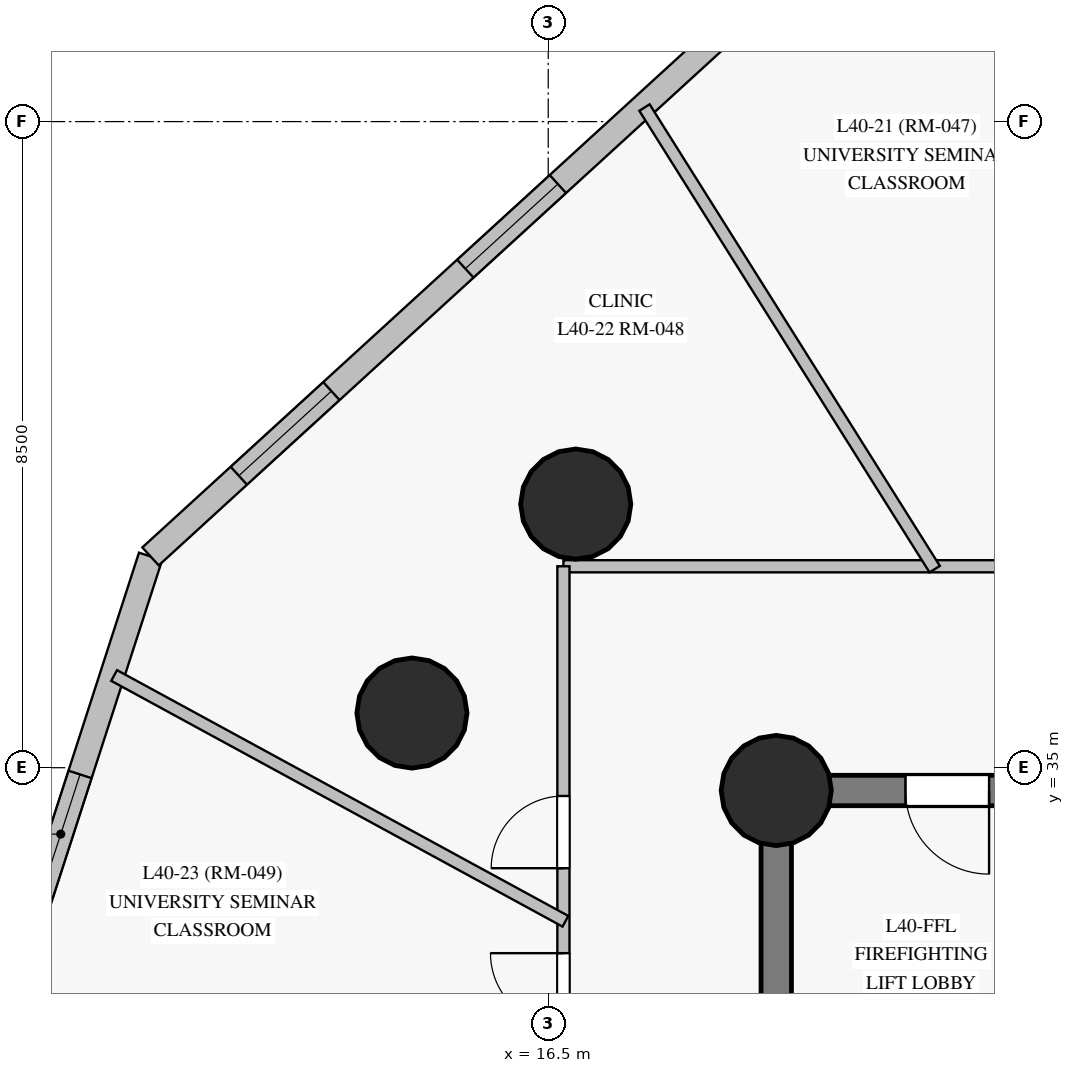
"""IFC4 building model, lengths in metres.
Left out: names, types, materials, properties, quantities, classifications, styles, units other than length and angle.
Written with IfcOpenShell. Run it as: python <this file> out.ifc"""

import sys

from ifc_helpers import new_model, si_unit, direction, frame, frame_2d, origin, origin_with_axes, origin_2d, place, context, subcontext, project, spatial, rectangle, circle, extrude, source, transform, mapped, element, fill, save


model = new_model("IFC4")
c1 = context("Model", 3, precision=1e-05, world=origin(), true_north=direction((0.0, 1.0)))
c2 = subcontext(c1, "Body", "Model", "MODEL_VIEW")
j1 = project(units=[si_unit("LENGTHUNIT", "METRE"), si_unit("PLANEANGLEUNIT", "RADIAN")], contexts=[c1])
p1 = place(None, origin())
s1 = spatial("IfcSite", under=j1, at=p1, CompositionType="ELEMENT")
p2 = place(p1, origin())
s2 = spatial("IfcBuilding", under=s1, at=p2, CompositionType="ELEMENT")
p3 = place(p2, frame((0.0, 0.0, 141.95)))
s3 = spatial("IfcBuildingStorey", under=s2, at=p3, CompositionType="ELEMENT", Elevation=141.95)
p4 = place(p3, frame((26.55, 34.7, 0.0), z_axis=(0.0, 0.0, 1.0), x_axis=(-1.0, 0.0, 0.0)))
e1 = element("IfcWall", 1, at=p4, inside=s3, PredefinedType="SHEAR", context=c2, shape_type="SweptSolid", body=[
    extrude(rectangle(XDim=7.05, YDim=0.4, at=frame_2d((3.525, 0.0))), origin(), (0.0, 0.0, 1.0), 2.825),
])
p5 = place(p4, frame((4.25, 0.0, 0.0)))
e2 = element("IfcOpeningElement", 2, at=p5, cuts=e1, PredefinedType="OPENING", context=c2, shape_type="SweptSolid", body=[
    extrude(rectangle(XDim=1.1, YDim=2.15, at=frame_2d((0.55, 1.075))), frame((0.0, 0.21, 0.0), z_axis=(0.0, -1.0, 0.0), x_axis=(1.0, 0.0, 0.0)), (0.0, 0.0, 1.0), 0.42),
])
p6 = place(p3, frame((19.5, 34.7, 0.0), z_axis=(0.0, 0.0, 1.0), x_axis=(0.0, -1.0, 0.0)))
e3 = element("IfcWall", 3, at=p6, inside=s3, PredefinedType="SHEAR", context=c2, shape_type="SweptSolid", body=[
    extrude(rectangle(XDim=16.4, YDim=0.4, at=frame_2d((8.2, 0.0))), origin(), (0.0, 0.0, 1.0), 2.825),
])
p7 = place(p6, frame((3.1, 0.0, 0.0)))
e4 = element("IfcOpeningElement", 4, at=p7, cuts=e3, PredefinedType="OPENING", context=c2, shape_type="SweptSolid", body=[
    extrude(rectangle(XDim=1.1, YDim=2.15, at=frame_2d((0.55, 1.075))), frame((0.0, 0.21, 0.0), z_axis=(0.0, -1.0, 0.0), x_axis=(1.0, 0.0, 0.0)), (0.0, 0.0, 1.0), 0.42),
])
m1 = source(origin_with_axes(), c2, "Body", "SweptSolid", [
    extrude(circle(Radius=0.725, at=origin_2d()), origin(), (0.0, 0.0, 1.0), 3.05),
])
for number, where, z_axis, x_axis in (
    (5, (19.5, 34.7, 0.0), (0.0, 0.0, 1.0), (1.0, 0.0, 0.0)),
    (6, (16.862, 38.468, 0.0), (0.0, 0.0, 1.0), (1.0, 0.0, 0.0)),
    (7, (14.707, 35.719, 0.0), (0.0, 0.0, 1.0), (1.0, 0.0, 0.0)),
):
    element("IfcColumn", number, at=place(p3, frame(where, z_axis=z_axis, x_axis=x_axis)), inside=s3, PredefinedType="COLUMN", context=c2, shape_type="MappedRepresentation", body=[
        mapped(m1, transform((0.0, 0.0, 0.0), scale=1.0)),
    ])
p8 = place(p3, frame((11.268, 37.78, 0.0), z_axis=(0.0, 0.0, 1.0), x_axis=(-0.307677236824, -0.951490787102, 0.0)))
e8 = element("IfcWall", 8, at=p8, inside=s3, PredefinedType="SOLIDWALL", context=c2, shape_type="SweptSolid", body=[
    extrude(rectangle(XDim=10.861, YDim=0.32, at=frame_2d((5.43, 0.0))), origin(), (0.0, 0.0, 1.0), 2.825),
])
p9 = place(p8, frame((3.014, 0.0, 0.85)))
e9 = element("IfcOpeningElement", 9, at=p9, cuts=e8, PredefinedType="OPENING", context=c2, shape_type="SweptSolid", body=[
    extrude(rectangle(XDim=1.65, YDim=1.65, at=frame_2d((0.825, 0.825))), frame((0.0, 0.17, 0.0), z_axis=(0.0, -1.0, 0.0), x_axis=(1.0, 0.0, 0.0)), (0.0, 0.0, 1.0), 0.34),
])
p10 = place(p8, frame((7.528, 0.0, 0.85)))
e10 = element("IfcOpeningElement", 10, at=p10, cuts=e8, PredefinedType="OPENING", context=c2, shape_type="SweptSolid", body=[
    extrude(rectangle(XDim=1.65, YDim=1.65, at=frame_2d((0.825, 0.825))), frame((0.0, 0.17, 0.0), z_axis=(0.0, -1.0, 0.0), x_axis=(1.0, 0.0, 0.0)), (0.0, 0.0, 1.0), 0.34),
])
p11 = place(p3, frame((21.277, 46.929, 0.0), z_axis=(0.0, 0.0, 1.0), x_axis=(-0.7380815776, -0.674711482641, 0.0)))
e11 = element("IfcWall", 11, at=p11, inside=s3, PredefinedType="SOLIDWALL", context=c2, shape_type="SweptSolid", body=[
    extrude(rectangle(XDim=13.561, YDim=0.32, at=frame_2d((6.781, 0.0))), origin(), (0.0, 0.0, 1.0), 2.825),
])
p12 = place(p11, frame((1.598, 0.0, 0.85)))
e12 = element("IfcOpeningElement", 12, at=p12, cuts=e11, PredefinedType="OPENING", context=c2, shape_type="SweptSolid", body=[
    extrude(rectangle(XDim=1.65, YDim=1.65, at=frame_2d((0.825, 0.825))), frame((0.0, 0.17, 0.0), z_axis=(0.0, -1.0, 0.0), x_axis=(1.0, 0.0, 0.0)), (0.0, 0.0, 1.0), 0.34),
])
p13 = place(p11, frame((6.3, 0.0, 0.85)))
e13 = element("IfcOpeningElement", 13, at=p13, cuts=e11, PredefinedType="OPENING", context=c2, shape_type="SweptSolid", body=[
    extrude(rectangle(XDim=1.65, YDim=1.65, at=frame_2d((0.825, 0.825))), frame((0.0, 0.17, 0.0), z_axis=(0.0, -1.0, 0.0), x_axis=(1.0, 0.0, 0.0)), (0.0, 0.0, 1.0), 0.34),
])
p14 = place(p11, frame((10.337, 0.0, 0.85)))
e14 = element("IfcOpeningElement", 14, at=p14, cuts=e11, PredefinedType="OPENING", context=c2, shape_type="SweptSolid", body=[
    extrude(rectangle(XDim=1.65, YDim=1.65, at=frame_2d((0.825, 0.825))), frame((0.0, 0.17, 0.0), z_axis=(0.0, -1.0, 0.0), x_axis=(1.0, 0.0, 0.0)), (0.0, 0.0, 1.0), 0.34),
])
p15 = place(p3, frame((16.7, 37.65, 0.0), z_axis=(0.0, 0.0, 1.0), x_axis=(1.0, 0.0, 0.0)))
e15 = element("IfcWall", 15, at=p15, inside=s3, PredefinedType="PARTITIONING", context=c2, shape_type="SweptSolid", body=[
    extrude(rectangle(XDim=23.5, YDim=0.16, at=frame_2d((11.75, 0.0))), origin(), (0.0, 0.0, 1.0), 2.325),
])
p16 = place(p15, frame((20.8, 0.0, 0.0)))
e16 = element("IfcOpeningElement", 16, at=p16, cuts=e15, PredefinedType="OPENING", context=c2, shape_type="SweptSolid", body=[
    extrude(rectangle(XDim=0.96, YDim=2.15, at=frame_2d((0.48, 1.075))), frame((0.0, 0.09, 0.0), z_axis=(0.0, -1.0, 0.0), x_axis=(1.0, 0.0, 0.0)), (0.0, 0.0, 1.0), 0.18),
])
p17 = place(p15, frame((11.275, 0.0, 0.0)))
e17 = element("IfcOpeningElement", 17, at=p17, cuts=e15, PredefinedType="OPENING", context=c2, shape_type="SweptSolid", body=[
    extrude(rectangle(XDim=0.96, YDim=2.15, at=frame_2d((0.48, 1.075))), frame((0.0, 0.09, 0.0), z_axis=(0.0, -1.0, 0.0), x_axis=(1.0, 0.0, 0.0)), (0.0, 0.0, 1.0), 0.18),
])
p18 = place(p15, frame((7.75, 0.0, 0.0)))
e18 = element("IfcOpeningElement", 18, at=p18, cuts=e15, PredefinedType="OPENING", context=c2, shape_type="SweptSolid", body=[
    extrude(rectangle(XDim=0.96, YDim=2.15, at=frame_2d((0.48, 1.075))), frame((0.0, 0.09, 0.0), z_axis=(0.0, -1.0, 0.0), x_axis=(1.0, 0.0, 0.0)), (0.0, 0.0, 1.0), 0.18),
])
p19 = place(p3, frame((16.7, 15.35, 0.0), z_axis=(0.0, 0.0, 1.0), x_axis=(0.0, 1.0, 0.0)))
e19 = element("IfcWall", 19, at=p19, inside=s3, PredefinedType="PARTITIONING", context=c2, shape_type="SweptSolid", body=[
    extrude(rectangle(XDim=22.3, YDim=0.16, at=frame_2d((11.15, 0.0))), origin(), (0.0, 0.0, 1.0), 2.225),
])
p20 = place(p19, frame((10.535, 0.0, 0.0)))
e20 = element("IfcOpeningElement", 20, at=p20, cuts=e19, PredefinedType="OPENING", context=c2, shape_type="SweptSolid", body=[
    extrude(rectangle(XDim=0.95, YDim=2.15, at=frame_2d((0.475, 1.075))), frame((0.0, 0.09, 0.0), z_axis=(0.0, -1.0, 0.0), x_axis=(1.0, 0.0, 0.0)), (0.0, 0.0, 1.0), 0.18),
])
p21 = place(p19, frame((6.221, 0.0, 0.0)))
e21 = element("IfcOpeningElement", 21, at=p21, cuts=e19, PredefinedType="OPENING", context=c2, shape_type="SweptSolid", body=[
    extrude(rectangle(XDim=0.96, YDim=2.15, at=frame_2d((0.48, 1.075))), frame((0.0, 0.09, 0.0), z_axis=(0.0, -1.0, 0.0), x_axis=(1.0, 0.0, 0.0)), (0.0, 0.0, 1.0), 0.18),
])
p22 = place(p19, frame((3.32, 0.0, 0.0)))
e22 = element("IfcOpeningElement", 22, at=p22, cuts=e19, PredefinedType="OPENING", context=c2, shape_type="SweptSolid", body=[
    extrude(rectangle(XDim=0.95, YDim=2.15, at=frame_2d((0.475, 1.075))), frame((0.0, 0.09, 0.0), z_axis=(0.0, -1.0, 0.0), x_axis=(1.0, 0.0, 0.0)), (0.0, 0.0, 1.0), 0.18),
])
p23 = place(p19, frame((18.328, 0.0, 0.0)))
e23 = element("IfcOpeningElement", 23, at=p23, cuts=e19, PredefinedType="OPENING", context=c2, shape_type="SweptSolid", body=[
    extrude(rectangle(XDim=0.95, YDim=2.15, at=frame_2d((0.475, 1.075))), frame((0.0, 0.09, 0.0), z_axis=(0.0, -1.0, 0.0), x_axis=(1.0, 0.0, 0.0)), (0.0, 0.0, 1.0), 0.18),
])
p24 = place(p19, frame((16.25, 0.0, 0.0)))
e24 = element("IfcOpeningElement", 24, at=p24, cuts=e19, PredefinedType="OPENING", context=c2, shape_type="SweptSolid", body=[
    extrude(rectangle(XDim=0.96, YDim=2.15, at=frame_2d((0.48, 1.075))), frame((0.0, 0.09, 0.0), z_axis=(0.0, -1.0, 0.0), x_axis=(1.0, 0.0, 0.0)), (0.0, 0.0, 1.0), 0.18),
])
p25 = place(p19, frame((13.38, 0.0, 0.0)))
e25 = element("IfcOpeningElement", 25, at=p25, cuts=e19, PredefinedType="OPENING", context=c2, shape_type="SweptSolid", body=[
    extrude(rectangle(XDim=0.96, YDim=2.15, at=frame_2d((0.48, 1.075))), frame((0.0, 0.09, 0.0), z_axis=(0.0, -1.0, 0.0), x_axis=(1.0, 0.0, 0.0)), (0.0, 0.0, 1.0), 0.18),
])
p26 = place(p3, frame((16.743, 29.934, 0.0), z_axis=(0.0, 0.0, 1.0), x_axis=(-0.961259340158, 0.275645571268, 0.0)))
e26 = element("IfcWall", 26, at=p26, inside=s3, PredefinedType="PARTITIONING", context=c2, shape_type="SweptSolid", body=[
    extrude(rectangle(XDim=7.603, YDim=0.16, at=frame_2d((3.801, 0.0))), origin(), (0.0, 0.0, 1.0), 2.825),
])
p27 = place(p3, frame((21.585, 37.612, 0.0), z_axis=(0.0, 0.0, 1.0), x_axis=(-0.532276089575, 0.84657082661, 0.0)))
e27 = element("IfcWall", 27, at=p27, inside=s3, PredefinedType="PARTITIONING", context=c2, shape_type="SweptSolid", body=[
    extrude(rectangle(XDim=7.174, YDim=0.16, at=frame_2d((3.587, 0.0))), origin(), (0.0, 0.0, 1.0), 2.825),
])
p28 = place(p3, frame((16.726, 32.98, 0.0), z_axis=(0.0, 0.0, 1.0), x_axis=(-0.878227967227, 0.478242237345, 0.0)))
e28 = element("IfcWall", 28, at=p28, inside=s3, PredefinedType="PARTITIONING", context=c2, shape_type="SweptSolid", body=[
    extrude(rectangle(XDim=6.76, YDim=0.16, at=frame_2d((3.38, 0.0))), origin(), (0.0, 0.0, 1.0), 2.825),
])
m2 = source(origin_with_axes(), c2, "Body", "SweptSolid", [
    extrude(rectangle(XDim=1.65, YDim=1.65, at=frame_2d((0.825, 0.825))), frame((0.0, 0.03, 0.0), z_axis=(0.0, -1.0, 0.0), x_axis=(1.0, 0.0, 0.0)), (0.0, 0.0, 1.0), 0.06),
])
p29 = place(p9, origin())
e29 = element("IfcWindow", 29, at=p29, inside=s3, PartitioningType="SINGLE_PANEL", PredefinedType="WINDOW", context=c2, shape_type="MappedRepresentation", body=[
    mapped(m2, transform((0.0, 0.0, 0.0), scale=1.0)),
])
fill(e9, e29)
p30 = place(p13, origin())
e30 = element("IfcWindow", 30, at=p30, inside=s3, PartitioningType="SINGLE_PANEL", PredefinedType="WINDOW", context=c2, shape_type="MappedRepresentation", body=[
    mapped(m2, transform((0.0, 0.0, 0.0), scale=1.0)),
])
fill(e13, e30)
p31 = place(p14, origin())
e31 = element("IfcWindow", 31, at=p31, inside=s3, PartitioningType="SINGLE_PANEL", PredefinedType="WINDOW", context=c2, shape_type="MappedRepresentation", body=[
    mapped(m2, transform((0.0, 0.0, 0.0), scale=1.0)),
])
fill(e14, e31)
m3 = source(origin_with_axes(), c2, "Body", "SweptSolid", [
    extrude(rectangle(XDim=1.1, YDim=2.15, at=frame_2d((0.55, 1.075))), frame((0.0, 0.025, 0.0), z_axis=(0.0, -1.0, 0.0), x_axis=(1.0, 0.0, 0.0)), (0.0, 0.0, 1.0), 0.05),
])
p32 = place(p5, origin())
e32 = element("IfcDoor", 32, at=p32, inside=s3, OperationType="SINGLE_SWING_LEFT", PredefinedType="DOOR", context=c2, shape_type="MappedRepresentation", body=[
    mapped(m3, transform((0.0, 0.0, 0.0), scale=1.0)),
])
fill(e2, e32)
m4 = source(origin_with_axes(), c2, "Body", "SweptSolid", [
    extrude(rectangle(XDim=0.95, YDim=2.15, at=frame_2d((0.475, 1.075))), frame((0.0, 0.025, 0.0), z_axis=(0.0, -1.0, 0.0), x_axis=(1.0, 0.0, 0.0)), (0.0, 0.0, 1.0), 0.05),
])
p33 = place(p23, origin())
e33 = element("IfcDoor", 33, at=p33, inside=s3, OperationType="SINGLE_SWING_LEFT", PredefinedType="DOOR", context=c2, shape_type="MappedRepresentation", body=[
    mapped(m4, transform((0.0, 0.0, 0.0), scale=1.0)),
])
fill(e23, e33)
m5 = source(origin_with_axes(), c2, "Body", "SweptSolid", [
    extrude(rectangle(XDim=0.96, YDim=2.15, at=frame_2d((0.48, 1.075))), frame((0.0, 0.025, 0.0), z_axis=(0.0, -1.0, 0.0), x_axis=(1.0, 0.0, 0.0)), (0.0, 0.0, 1.0), 0.05),
])
p34 = place(p24, origin())
e34 = element("IfcDoor", 34, at=p34, inside=s3, OperationType="SINGLE_SWING_RIGHT", PredefinedType="DOOR", context=c2, shape_type="MappedRepresentation", body=[
    mapped(m5, transform((0.0, 0.0, 0.0), scale=1.0)),
])
fill(e24, e34)
save(model, sys.argv[1])
